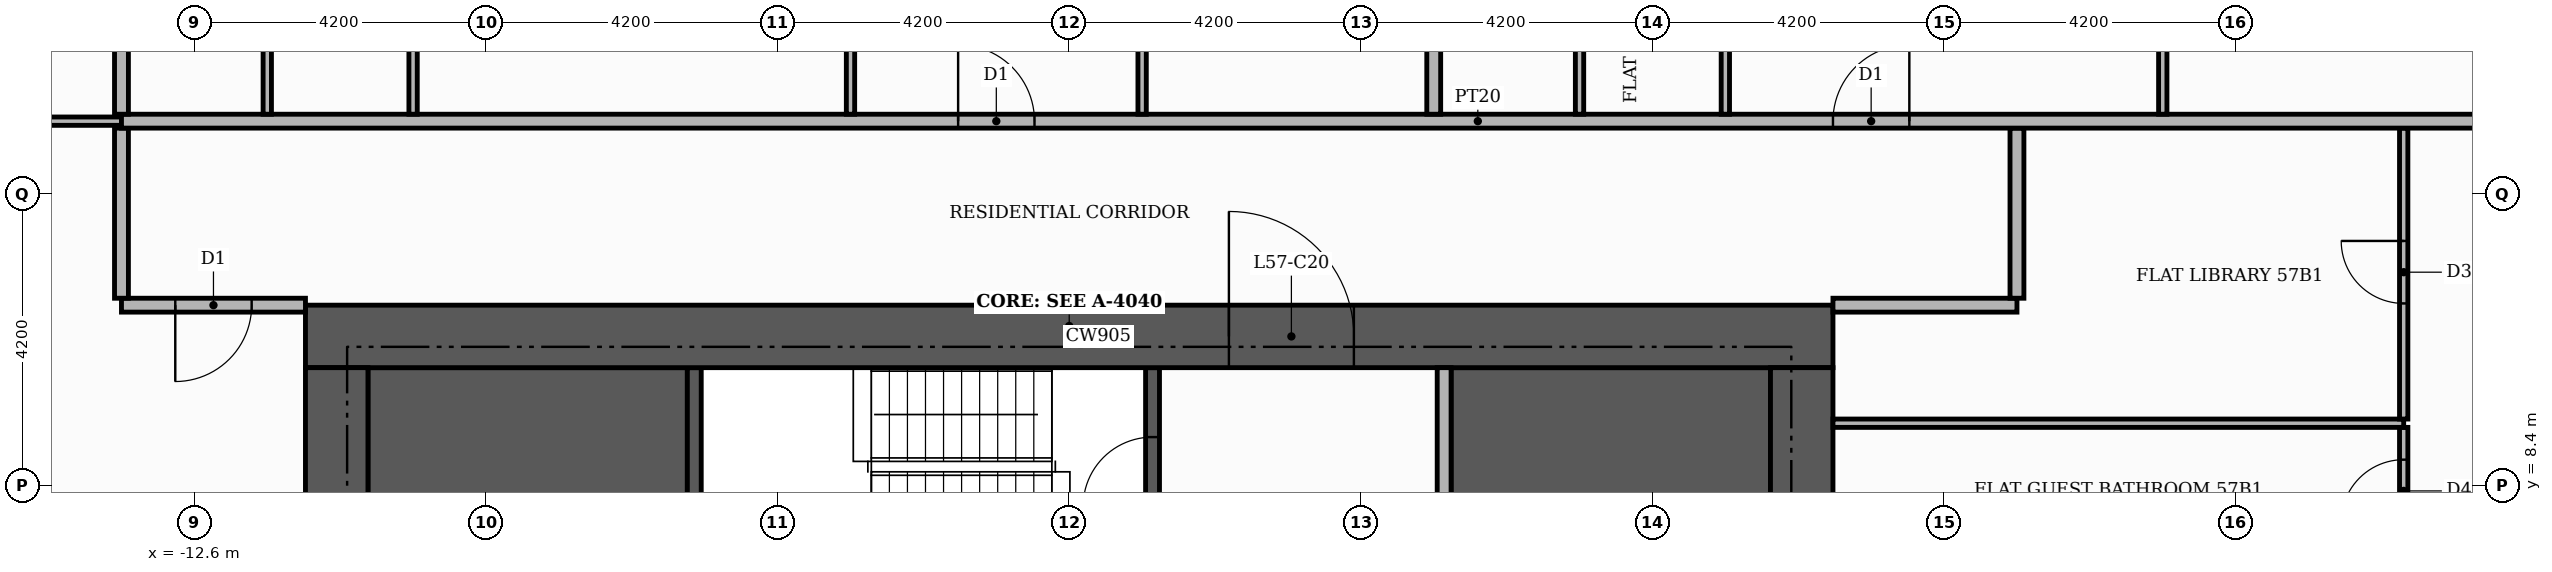
"""IFC4 building model, lengths in metres.
Left out: names, types, materials, properties, quantities, classifications, styles, units other than length and angle.
Written with IfcOpenShell. Run it as: python <this file> out.ifc"""

import sys

from ifc_helpers import new_model, si_unit, direction, frame, frame_2d, origin, place, context, subcontext, project, spatial, rectangle, extrude, element, fill, save


model = new_model("IFC4")
c1 = context("Model", 3, precision=1e-05, world=origin(), true_north=direction((0.0, 1.0)))
c2 = subcontext(c1, "Body", "Model", "MODEL_VIEW")
j1 = project(units=[si_unit("LENGTHUNIT", "METRE"), si_unit("PLANEANGLEUNIT", "RADIAN")], contexts=[c1])
p1 = place(None, origin())
s1 = spatial("IfcSite", under=j1, at=p1, CompositionType="ELEMENT")
p2 = place(p1, origin())
s2 = spatial("IfcBuilding", under=s1, at=p2, CompositionType="ELEMENT")
p3 = place(p2, frame((0.0, 0.0, 240.6)))
s3 = spatial("IfcBuildingStorey", under=s2, at=p3, CompositionType="ELEMENT", Elevation=240.6)
for number, where, z_axis, x_axis in (
    (1, (-10.1, 9.15, 0.0), (0.0, 0.0, 1.0), (1.0, 0.0, 0.0)),
    (2, (5.5, 9.15, 0.0), (0.0, 0.0, 1.0), (1.0, 0.0, 0.0)),
):
    element("IfcWall", number, at=place(p3, frame(where, z_axis=z_axis, x_axis=x_axis)), inside=s3, PredefinedType="SHEAR", context=c2, shape_type="SweptSolid", body=[
        extrude(rectangle(XDim=4.6, YDim=1.9, at=frame_2d((2.3, 0.0))), origin(), (0.0, 0.0, 1.0), 3.48),
    ])
p4 = place(p3, frame((-5.4, 7.25, 0.0), z_axis=(0.0, 0.0, 1.0), x_axis=(0.0, 1.0, 0.0)))
e3 = element("IfcWall", 3, at=p4, inside=s3, PredefinedType="SHEAR", context=c2, shape_type="SweptSolid", body=[
    extrude(rectangle(XDim=2.85, YDim=0.2, at=frame_2d((1.425, 0.0))), origin(), (0.0, 0.0, 1.0), 3.48),
])
p5 = place(p3, frame((1.2, 7.25, 0.0), z_axis=(0.0, 0.0, 1.0), x_axis=(0.0, 1.0, 0.0)))
e4 = element("IfcWall", 4, at=p5, inside=s3, PredefinedType="SHEAR", context=c2, shape_type="SweptSolid", body=[
    extrude(rectangle(XDim=2.85, YDim=0.2, at=frame_2d((1.425, 0.0))), origin(), (0.0, 0.0, 1.0), 3.48),
])
p6 = place(p5, frame((0.85, 0.0, 0.0)))
e5 = element("IfcOpeningElement", 5, at=p6, cuts=e4, PredefinedType="OPENING", context=c2, shape_type="SweptSolid", body=[
    extrude(rectangle(XDim=1.0, YDim=2.1, at=frame_2d((0.5, 1.05))), frame((0.0, 0.11, 0.0), z_axis=(0.0, -1.0, 0.0), x_axis=(1.0, 0.0, 0.0)), (0.0, 0.0, 1.0), 0.22),
])
p7 = place(p3, frame((-11.0, 10.55, 0.0), z_axis=(0.0, 0.0, 1.0), x_axis=(1.0, 0.0, 0.0)))
e6 = element("IfcWall", 6, at=p7, inside=s3, PredefinedType="SHEAR", context=c2, shape_type="SweptSolid", body=[
    extrude(rectangle(XDim=22.0, YDim=0.9, at=frame_2d((11.0, 0.0))), origin(), (0.0, 0.0, 1.0), 3.48),
])
p8 = place(p7, frame((13.3, 0.0, 0.0)))
e7 = element("IfcOpeningElement", 7, at=p8, cuts=e6, PredefinedType="OPENING", context=c2, shape_type="SweptSolid", body=[
    extrude(rectangle(XDim=1.8, YDim=2.2, at=frame_2d((0.9, 1.1))), frame((0.0, 0.46, 0.0), z_axis=(0.0, -1.0, 0.0), x_axis=(1.0, 0.0, 0.0)), (0.0, 0.0, 1.0), 0.92),
])
for number, where, z_axis, x_axis in (
    (8, (-10.55, -10.1, 0.0), (0.0, 0.0, 1.0), (0.0, 1.0, 0.0)),
    (9, (10.55, -10.1, 0.0), (0.0, 0.0, 1.0), (0.0, 1.0, 0.0)),
):
    element("IfcWall", number, at=place(p3, frame(where, z_axis=z_axis, x_axis=x_axis)), inside=s3, PredefinedType="SHEAR", context=c2, shape_type="SweptSolid", body=[
        extrude(rectangle(XDim=20.2, YDim=0.9, at=frame_2d((10.1, 0.0))), origin(), (0.0, 0.0, 1.0), 3.48),
    ])
p9 = place(p3, frame((5.4, 5.5, 0.0), z_axis=(0.0, 0.0, 1.0), x_axis=(0.0, 1.0, 0.0)))
e10 = element("IfcWall", 10, at=p9, inside=s3, PredefinedType="PARTITIONING", context=c2, shape_type="SweptSolid", body=[
    extrude(rectangle(XDim=4.6, YDim=0.2, at=frame_2d((2.3, 0.0))), origin(), (0.0, 0.0, 1.0), 3.48),
])
p10 = place(p9, frame((0.25, 0.0, 0.0)))
e11 = element("IfcOpeningElement", 11, at=p10, cuts=e10, PredefinedType="OPENING", context=c2, shape_type="SweptSolid", body=[
    extrude(rectangle(XDim=1.0, YDim=2.1, at=frame_2d((0.5, 1.05))), frame((0.0, 0.11, 0.0), z_axis=(0.0, -1.0, 0.0), x_axis=(1.0, 0.0, 0.0)), (0.0, 0.0, 1.0), 0.22),
])
p11 = place(p3, frame((19.22, 7.41, 0.0), z_axis=(0.0, 0.0, 1.0), x_axis=(0.0, 1.0, 0.0)))
e12 = element("IfcWall", 12, at=p11, inside=s3, PredefinedType="PARTITIONING", context=c2, shape_type="SweptSolid", body=[
    extrude(rectangle(XDim=1.83, YDim=0.12, at=frame_2d((0.915, 0.0))), origin(), (0.0, 0.0, 1.0), 3.48),
])
p12 = place(p11, frame((0.465, 0.0, 0.0)))
e13 = element("IfcOpeningElement", 13, at=p12, cuts=e12, PredefinedType="OPENING", context=c2, shape_type="SweptSolid", body=[
    extrude(rectangle(XDim=0.9, YDim=2.1, at=frame_2d((0.45, 1.05))), frame((0.0, 0.07, 0.0), z_axis=(0.0, -1.0, 0.0), x_axis=(1.0, 0.0, 0.0)), (0.0, 0.0, 1.0), 0.14),
])
p13 = place(p3, frame((11.0, 9.3, 0.0), z_axis=(0.0, 0.0, 1.0), x_axis=(1.0, 0.0, 0.0)))
e14 = element("IfcWall", 14, at=p13, inside=s3, PredefinedType="PARTITIONING", context=c2, shape_type="SweptSolid", body=[
    extrude(rectangle(XDim=8.22, YDim=0.12, at=frame_2d((4.11, 0.0))), origin(), (0.0, 0.0, 1.0), 3.48),
])
p14 = place(p3, frame((19.22, 9.36, 0.0), z_axis=(0.0, 0.0, 1.0), x_axis=(0.0, 1.0, 0.0)))
e15 = element("IfcWall", 15, at=p14, inside=s3, PredefinedType="PARTITIONING", context=c2, shape_type="SweptSolid", body=[
    extrude(rectangle(XDim=4.19, YDim=0.12, at=frame_2d((2.095, 0.0))), origin(), (0.0, 0.0, 1.0), 3.48),
])
p15 = place(p14, frame((1.665, 0.0, 0.0)))
e16 = element("IfcOpeningElement", 16, at=p15, cuts=e15, PredefinedType="OPENING", context=c2, shape_type="SweptSolid", body=[
    extrude(rectangle(XDim=0.9, YDim=2.1, at=frame_2d((0.45, 1.05))), frame((0.0, 0.07, 0.0), z_axis=(0.0, -1.0, 0.0), x_axis=(1.0, 0.0, 0.0)), (0.0, 0.0, 1.0), 0.14),
])
p16 = place(p3, frame((-13.65, 11.0, 0.0), z_axis=(0.0, 0.0, 1.0), x_axis=(1.0, 0.0, 0.0)))
e17 = element("IfcWall", 17, at=p16, inside=s3, PredefinedType="PARTITIONING", context=c2, shape_type="SweptSolid", body=[
    extrude(rectangle(XDim=2.65, YDim=0.2, at=frame_2d((1.325, 0.0))), origin(), (0.0, 0.0, 1.0), 3.48),
])
p17 = place(p16, frame((0.775, 0.0, 0.0)))
e18 = element("IfcOpeningElement", 18, at=p17, cuts=e17, PredefinedType="OPENING", context=c2, shape_type="SweptSolid", body=[
    extrude(rectangle(XDim=1.1, YDim=2.4, at=frame_2d((0.55, 1.2))), frame((0.0, 0.11, 0.0), z_axis=(0.0, -1.0, 0.0), x_axis=(1.0, 0.0, 0.0)), (0.0, 0.0, 1.0), 0.22),
])
p18 = place(p3, frame((11.0, 11.0, 0.0), z_axis=(0.0, 0.0, 1.0), x_axis=(1.0, 0.0, 0.0)))
e19 = element("IfcWall", 19, at=p18, inside=s3, PredefinedType="PARTITIONING", context=c2, shape_type="SweptSolid", body=[
    extrude(rectangle(XDim=2.65, YDim=0.2, at=frame_2d((1.325, 0.0))), origin(), (0.0, 0.0, 1.0), 3.48),
])
for number, where, z_axis, x_axis in (
    (20, (-13.65, 11.1, 0.0), (0.0, 0.0, 1.0), (0.0, 1.0, 0.0)),
    (21, (13.65, 11.1, 0.0), (0.0, 0.0, 1.0), (0.0, 1.0, 0.0)),
):
    element("IfcWall", number, at=place(p3, frame(where, z_axis=z_axis, x_axis=x_axis)), inside=s3, PredefinedType="PARTITIONING", context=c2, shape_type="SweptSolid", body=[
        extrude(rectangle(XDim=2.45, YDim=0.2, at=frame_2d((1.225, 0.0))), origin(), (0.0, 0.0, 1.0), 3.48),
    ])
p19 = place(p3, frame((-19.82, 13.65, 0.0), z_axis=(0.0, 0.0, 1.0), x_axis=(1.0, 0.0, 0.0)))
e22 = element("IfcWall", 22, at=p19, inside=s3, PredefinedType="PARTITIONING", context=c2, shape_type="SweptSolid", body=[
    extrude(rectangle(XDim=6.17, YDim=0.12, at=frame_2d((3.085, 0.0))), origin(), (0.0, 0.0, 1.0), 3.48),
])
p20 = place(p19, frame((2.635, 0.0, 0.0)))
e23 = element("IfcOpeningElement", 23, at=p20, cuts=e22, PredefinedType="OPENING", context=c2, shape_type="SweptSolid", body=[
    extrude(rectangle(XDim=0.9, YDim=2.1, at=frame_2d((0.45, 1.05))), frame((0.0, 0.07, 0.0), z_axis=(0.0, -1.0, 0.0), x_axis=(1.0, 0.0, 0.0)), (0.0, 0.0, 1.0), 0.14),
])
p21 = place(p3, frame((-13.65, 13.65, 0.0), z_axis=(0.0, 0.0, 1.0), x_axis=(1.0, 0.0, 0.0)))
e24 = element("IfcWall", 24, at=p21, inside=s3, PredefinedType="PARTITIONING", context=c2, shape_type="SweptSolid", body=[
    extrude(rectangle(XDim=39.07, YDim=0.2, at=frame_2d((19.535, 0.0))), origin(), (0.0, 0.0, 1.0), 3.48),
])
p22 = place(p21, frame((24.65, 0.0, 0.0)))
e25 = element("IfcOpeningElement", 25, at=p22, cuts=e24, PredefinedType="OPENING", context=c2, shape_type="SweptSolid", body=[
    extrude(rectangle(XDim=1.1, YDim=2.4, at=frame_2d((0.55, 1.2))), frame((0.0, 0.11, 0.0), z_axis=(0.0, -1.0, 0.0), x_axis=(1.0, 0.0, 0.0)), (0.0, 0.0, 1.0), 0.22),
])
p23 = place(p21, frame((12.05, 0.0, 0.0)))
e26 = element("IfcOpeningElement", 26, at=p23, cuts=e24, PredefinedType="OPENING", context=c2, shape_type="SweptSolid", body=[
    extrude(rectangle(XDim=1.1, YDim=2.4, at=frame_2d((0.55, 1.2))), frame((0.0, 0.11, 0.0), z_axis=(0.0, -1.0, 0.0), x_axis=(1.0, 0.0, 0.0)), (0.0, 0.0, 1.0), 0.22),
])
p24 = place(p3, frame((-13.65, 13.75, 0.0), z_axis=(0.0, 0.0, 1.0), x_axis=(0.0, 1.0, 0.0)))
e27 = element("IfcWall", 27, at=p24, inside=s3, PredefinedType="PARTITIONING", context=c2, shape_type="SweptSolid", body=[
    extrude(rectangle(XDim=11.67, YDim=0.2, at=frame_2d((5.835, 0.0))), origin(), (0.0, 0.0, 1.0), 3.48),
])
for number, where, z_axis, x_axis in (
    (28, (-11.55, 13.75, 0.0), (0.0, 0.0, 1.0), (0.0, 1.0, 0.0)),
    (29, (-9.45, 13.75, 0.0), (0.0, 0.0, 1.0), (0.0, 1.0, 0.0)),
    (30, (-3.15, 13.75, 0.0), (0.0, 0.0, 1.0), (0.0, 1.0, 0.0)),
):
    element("IfcWall", number, at=place(p3, frame(where, z_axis=z_axis, x_axis=x_axis)), inside=s3, PredefinedType="PARTITIONING", context=c2, shape_type="SweptSolid", body=[
        extrude(rectangle(XDim=5.11, YDim=0.12, at=frame_2d((2.555, 0.0))), origin(), (0.0, 0.0, 1.0), 3.48),
    ])
p25 = place(p3, frame((1.05, 13.75, 0.0), z_axis=(0.0, 0.0, 1.0), x_axis=(0.0, 1.0, 0.0)))
e31 = element("IfcWall", 31, at=p25, inside=s3, PredefinedType="PARTITIONING", context=c2, shape_type="SweptSolid", body=[
    extrude(rectangle(XDim=5.11, YDim=0.12, at=frame_2d((2.555, 0.0))), origin(), (0.0, 0.0, 1.0), 3.48),
])
p26 = place(p25, frame((2.085, 0.0, 0.0)))
e32 = element("IfcOpeningElement", 32, at=p26, cuts=e31, PredefinedType="OPENING", context=c2, shape_type="SweptSolid", body=[
    extrude(rectangle(XDim=0.9, YDim=2.1, at=frame_2d((0.45, 1.05))), frame((0.0, 0.07, 0.0), z_axis=(0.0, -1.0, 0.0), x_axis=(1.0, 0.0, 0.0)), (0.0, 0.0, 1.0), 0.14),
])
p27 = place(p3, frame((5.25, 13.75, 0.0), z_axis=(0.0, 0.0, 1.0), x_axis=(0.0, 1.0, 0.0)))
e33 = element("IfcWall", 33, at=p27, inside=s3, PredefinedType="PARTITIONING", context=c2, shape_type="SweptSolid", body=[
    extrude(rectangle(XDim=11.67, YDim=0.2, at=frame_2d((5.835, 0.0))), origin(), (0.0, 0.0, 1.0), 3.48),
])
p28 = place(p3, frame((7.35, 13.75, 0.0), z_axis=(0.0, 0.0, 1.0), x_axis=(0.0, 1.0, 0.0)))
e34 = element("IfcWall", 34, at=p28, inside=s3, PredefinedType="PARTITIONING", context=c2, shape_type="SweptSolid", body=[
    extrude(rectangle(XDim=4.51, YDim=0.12, at=frame_2d((2.255, 0.0))), origin(), (0.0, 0.0, 1.0), 3.48),
])
p29 = place(p3, frame((9.45, 13.75, 0.0), z_axis=(0.0, 0.0, 1.0), x_axis=(0.0, 1.0, 0.0)))
e35 = element("IfcWall", 35, at=p29, inside=s3, PredefinedType="PARTITIONING", context=c2, shape_type="SweptSolid", body=[
    extrude(rectangle(XDim=4.51, YDim=0.12, at=frame_2d((2.255, 0.0))), origin(), (0.0, 0.0, 1.0), 3.48),
])
p30 = place(p29, frame((1.785, 0.0, 0.0)))
e36 = element("IfcOpeningElement", 36, at=p30, cuts=e35, PredefinedType="OPENING", context=c2, shape_type="SweptSolid", body=[
    extrude(rectangle(XDim=0.9, YDim=2.1, at=frame_2d((0.45, 1.05))), frame((0.0, 0.07, 0.0), z_axis=(0.0, -1.0, 0.0), x_axis=(1.0, 0.0, 0.0)), (0.0, 0.0, 1.0), 0.14),
])
p31 = place(p3, frame((15.75, 13.75, 0.0), z_axis=(0.0, 0.0, 1.0), x_axis=(0.0, 1.0, 0.0)))
e37 = element("IfcWall", 37, at=p31, inside=s3, PredefinedType="PARTITIONING", context=c2, shape_type="SweptSolid", body=[
    extrude(rectangle(XDim=6.01, YDim=0.12, at=frame_2d((3.005, 0.0))), origin(), (0.0, 0.0, 1.0), 3.48),
])
p32 = place(p31, frame((2.485, 0.0, 0.0)))
e38 = element("IfcOpeningElement", 38, at=p32, cuts=e37, PredefinedType="OPENING", context=c2, shape_type="SweptSolid", body=[
    extrude(rectangle(XDim=1.0, YDim=2.1, at=frame_2d((0.5, 1.05))), frame((0.0, 0.07, 0.0), z_axis=(0.0, -1.0, 0.0), x_axis=(1.0, 0.0, 0.0)), (0.0, 0.0, 1.0), 0.14),
])
p33 = place(p6, origin())
e39 = element("IfcDoor", 39, at=p33, inside=s3, OperationType="SINGLE_SWING_LEFT", PredefinedType="DOOR", context=c2, shape_type="SweptSolid", body=[
    extrude(rectangle(XDim=1.0, YDim=2.1, at=frame_2d((0.5, 1.05))), frame((0.0, 0.025, 0.0), z_axis=(0.0, -1.0, 0.0), x_axis=(1.0, 0.0, 0.0)), (0.0, 0.0, 1.0), 0.05),
])
fill(e5, e39)
p34 = place(p8, origin())
e40 = element("IfcDoor", 40, at=p34, inside=s3, OperationType="DOUBLE_DOOR_SINGLE_SWING", PredefinedType="DOOR", context=c2, shape_type="SweptSolid", body=[
    extrude(rectangle(XDim=1.8, YDim=2.2, at=frame_2d((0.9, 1.1))), frame((0.0, 0.025, 0.0), z_axis=(0.0, -1.0, 0.0), x_axis=(1.0, 0.0, 0.0)), (0.0, 0.0, 1.0), 0.05),
])
fill(e7, e40)
p35 = place(p12, origin())
e41 = element("IfcDoor", 41, at=p35, inside=s3, OperationType="SINGLE_SWING_LEFT", PredefinedType="DOOR", context=c2, shape_type="SweptSolid", body=[
    extrude(rectangle(XDim=0.9, YDim=2.1, at=frame_2d((0.45, 1.05))), frame((0.0, 0.025, 0.0), z_axis=(0.0, -1.0, 0.0), x_axis=(1.0, 0.0, 0.0)), (0.0, 0.0, 1.0), 0.05),
])
fill(e13, e41)
p36 = place(p15, origin())
e42 = element("IfcDoor", 42, at=p36, inside=s3, OperationType="SINGLE_SWING_RIGHT", PredefinedType="DOOR", context=c2, shape_type="SweptSolid", body=[
    extrude(rectangle(XDim=0.9, YDim=2.1, at=frame_2d((0.45, 1.05))), frame((0.0, 0.025, 0.0), z_axis=(0.0, -1.0, 0.0), x_axis=(1.0, 0.0, 0.0)), (0.0, 0.0, 1.0), 0.05),
])
fill(e16, e42)
p37 = place(p22, origin())
e43 = element("IfcDoor", 43, at=p37, inside=s3, OperationType="SINGLE_SWING_RIGHT", PredefinedType="DOOR", context=c2, shape_type="SweptSolid", body=[
    extrude(rectangle(XDim=1.1, YDim=2.4, at=frame_2d((0.55, 1.2))), frame((0.0, 0.025, 0.0), z_axis=(0.0, -1.0, 0.0), x_axis=(1.0, 0.0, 0.0)), (0.0, 0.0, 1.0), 0.05),
])
fill(e25, e43)
p38 = place(p23, origin())
e44 = element("IfcDoor", 44, at=p38, inside=s3, OperationType="SINGLE_SWING_LEFT", PredefinedType="DOOR", context=c2, shape_type="SweptSolid", body=[
    extrude(rectangle(XDim=1.1, YDim=2.4, at=frame_2d((0.55, 1.2))), frame((0.0, 0.025, 0.0), z_axis=(0.0, -1.0, 0.0), x_axis=(1.0, 0.0, 0.0)), (0.0, 0.0, 1.0), 0.05),
])
fill(e26, e44)
p39 = place(p17, frame((1.1, 0.0, 0.0), z_axis=(0.0, 0.0, 1.0), x_axis=(-1.0, 0.0, 0.0)))
e45 = element("IfcDoor", 45, at=p39, inside=s3, OperationType="SINGLE_SWING_LEFT", PredefinedType="DOOR", context=c2, shape_type="SweptSolid", body=[
    extrude(rectangle(XDim=1.1, YDim=2.4, at=frame_2d((0.55, 1.2))), frame((0.0, 0.025, 0.0), z_axis=(0.0, -1.0, 0.0), x_axis=(1.0, 0.0, 0.0)), (0.0, 0.0, 1.0), 0.05),
])
fill(e18, e45)
save(model, sys.argv[1])
